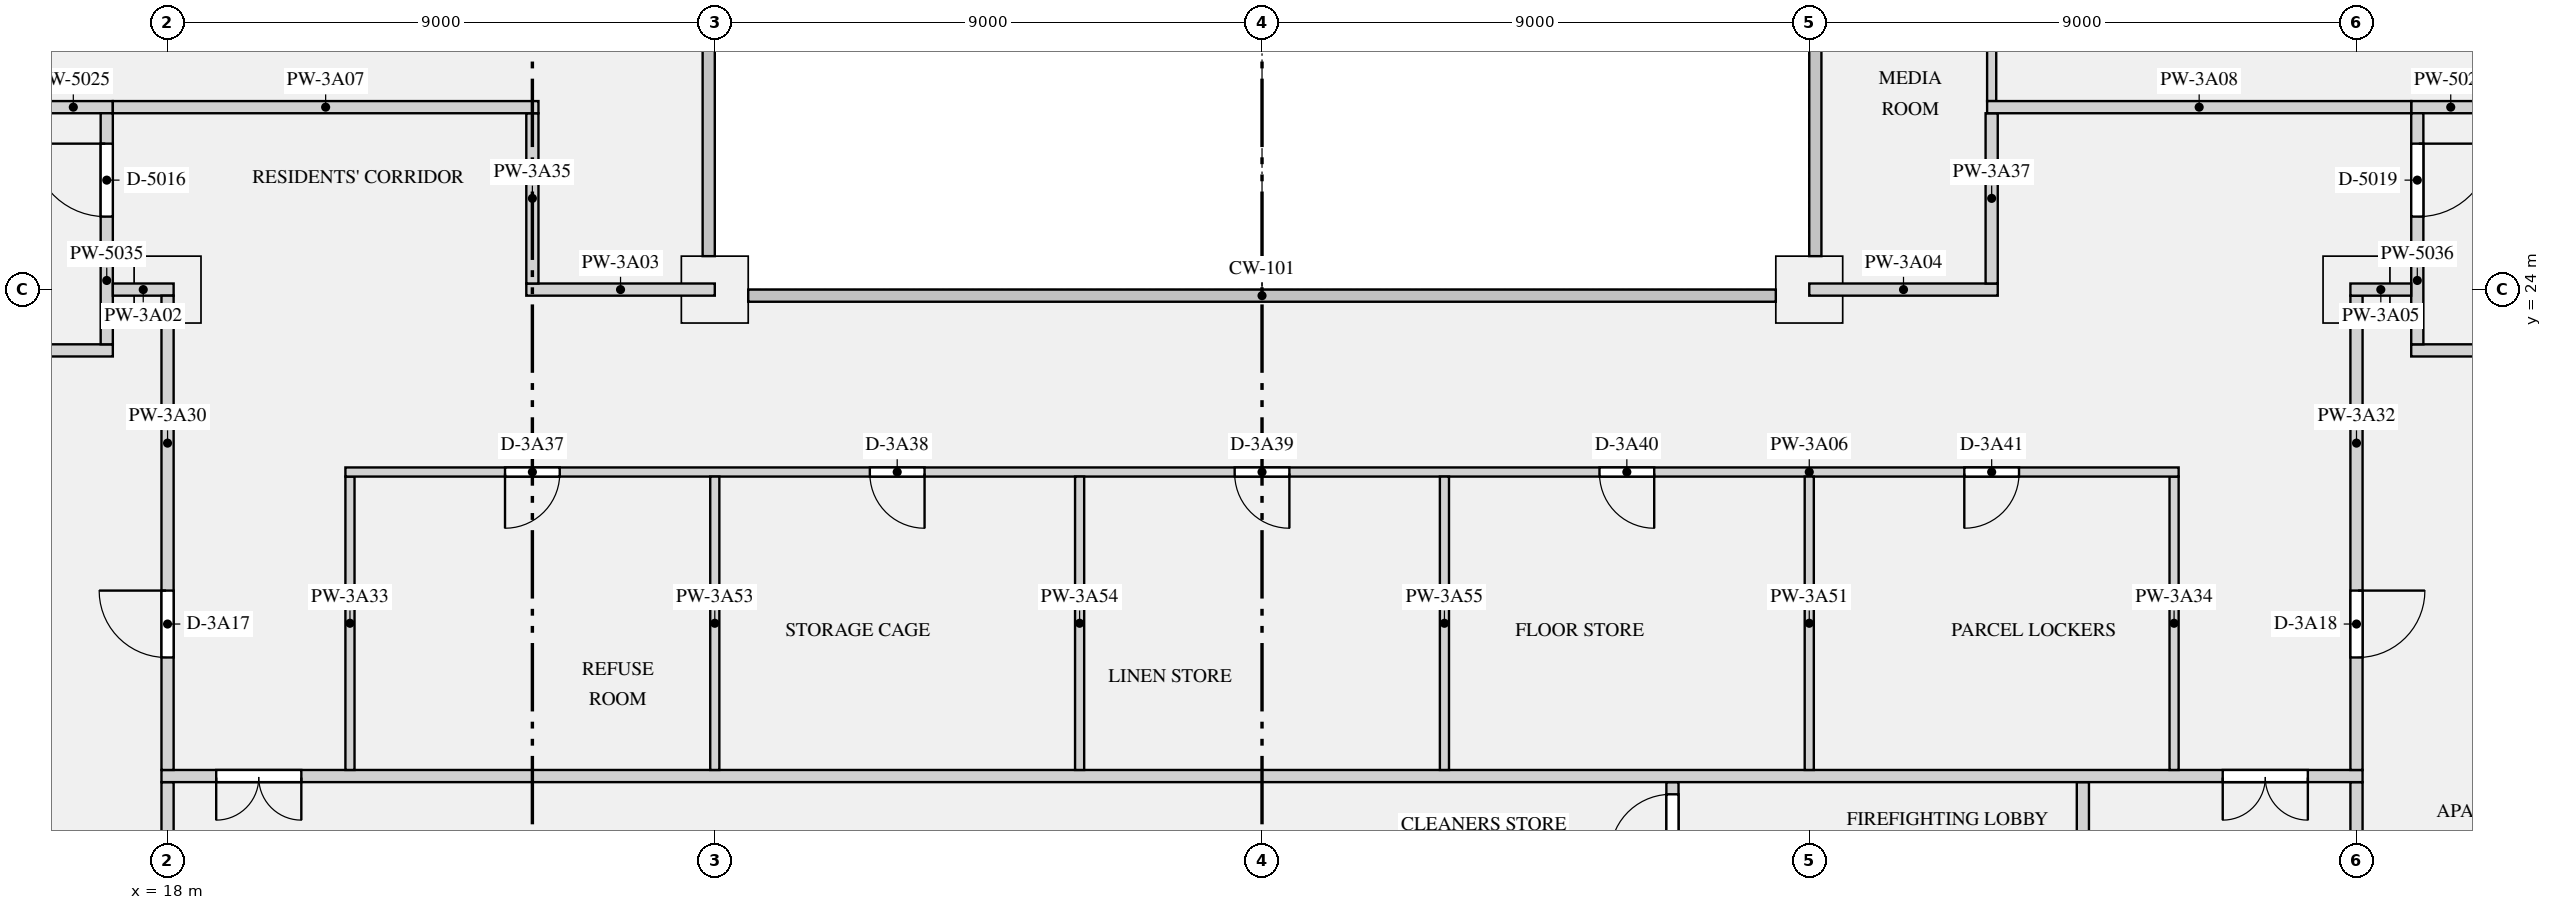
"""IFC4 building model, lengths in metres.
Left out: names, types, materials, properties, quantities, classifications, styles, units other than length and angle.
Written with IfcOpenShell. Run it as: python <this file> out.ifc"""

import sys

from ifc_helpers import new_model, si_unit, direction, frame, frame_2d, origin, origin_2d, place, context, subcontext, project, spatial, rectangle, extrude, element, fill, save


model = new_model("IFC4")
c1 = context("Model", 3, precision=1e-05, world=origin(), true_north=direction((0.0, 1.0)))
c2 = subcontext(c1, "Body", "Model", "MODEL_VIEW")
j1 = project(units=[si_unit("LENGTHUNIT", "METRE"), si_unit("PLANEANGLEUNIT", "RADIAN")], contexts=[c1])
p1 = place(None, origin())
s1 = spatial("IfcSite", under=j1, at=p1, CompositionType="ELEMENT")
p2 = place(p1, origin())
s2 = spatial("IfcBuilding", under=s1, at=p2, CompositionType="ELEMENT")
p3 = place(p2, frame((0.0, 0.0, 141.3)))
s3 = spatial("IfcBuildingStorey", under=s2, at=p3, CompositionType="ELEMENT", Elevation=141.3)
for number, where, z_axis, x_axis in (
    (1, (18.0, 24.0, 0.0), (0.0, 0.0, 1.0), (1.0, 0.0, 0.0)),
    (2, (27.0, 24.0, 0.0), (0.0, 0.0, 1.0), (1.0, 0.0, 0.0)),
    (3, (45.0, 24.0, 0.0), (0.0, 0.0, 1.0), (1.0, 0.0, 0.0)),
    (4, (54.0, 24.0, 0.0), (0.0, 0.0, 1.0), (1.0, 0.0, 0.0)),
):
    element("IfcColumn", number, at=place(p3, frame(where, z_axis=z_axis, x_axis=x_axis)), inside=s3, PredefinedType="COLUMN", context=c2, shape_type="SweptSolid", body=[
        extrude(rectangle(XDim=1.1, YDim=1.1, at=origin_2d()), origin(), (0.0, 0.0, 1.0), 3.15),
    ])
for number, where, z_axis, x_axis in (
    (5, (12.1, 23.0, 0.0), (0.0, 0.0, 1.0), (1.0, 0.0, 0.0)),
    (6, (54.9, 23.0, 0.0), (0.0, 0.0, 1.0), (1.0, 0.0, 0.0)),
):
    element("IfcWall", number, at=place(p3, frame(where, z_axis=z_axis, x_axis=x_axis)), inside=s3, PredefinedType="PARTITIONING", context=c2, shape_type="SweptSolid", body=[
        extrude(rectangle(XDim=5.0, YDim=0.2, at=frame_2d((2.5, 0.0))), origin(), (0.0, 0.0, 1.0), 2.83),
    ])
for number, where, z_axis, x_axis in (
    (7, (15.8, 27.0, 0.0), (0.0, 0.0, 1.0), (1.0, 0.0, 0.0)),
    (8, (54.9, 27.0, 0.0), (0.0, 0.0, 1.0), (1.0, 0.0, 0.0)),
):
    element("IfcWall", number, at=place(p3, frame(where, z_axis=z_axis, x_axis=x_axis)), inside=s3, PredefinedType="PARTITIONING", context=c2, shape_type="SweptSolid", body=[
        extrude(rectangle(XDim=1.3, YDim=0.2, at=frame_2d((0.65, 0.0))), origin(), (0.0, 0.0, 1.0), 2.83),
    ])
p4 = place(p3, frame((18.0, 12.5, 0.0), z_axis=(0.0, 0.0, 1.0), x_axis=(0.0, 1.0, 0.0)))
e9 = element("IfcWall", 9, at=p4, inside=s3, PredefinedType="PARTITIONING", context=c2, shape_type="SweptSolid", body=[
    extrude(rectangle(XDim=3.4, YDim=0.2, at=frame_2d((1.7, 0.0))), origin(), (0.0, 0.0, 1.0), 2.83),
])
p5 = place(p3, frame((49.5, 12.5, 0.0), z_axis=(0.0, 0.0, 1.0), x_axis=(0.0, 1.0, 0.0)))
e10 = element("IfcWall", 10, at=p5, inside=s3, PredefinedType="PARTITIONING", context=c2, shape_type="SweptSolid", body=[
    extrude(rectangle(XDim=3.4, YDim=0.2, at=frame_2d((1.7, 0.0))), origin(), (0.0, 0.0, 1.0), 2.83),
])
p6 = place(p5, frame((1.15, 0.0, 0.0)))
e11 = element("IfcOpeningElement", 11, at=p6, cuts=e10, PredefinedType="OPENING", context=c2, shape_type="SweptSolid", body=[
    extrude(rectangle(XDim=1.1, YDim=2.1, at=frame_2d((0.55, 1.05))), frame((0.0, 0.11, 0.0), z_axis=(0.0, -1.0, 0.0), x_axis=(1.0, 0.0, 0.0)), (0.0, 0.0, 1.0), 0.22),
])
p7 = place(p3, frame((54.0, 12.5, 0.0), z_axis=(0.0, 0.0, 1.0), x_axis=(0.0, 1.0, 0.0)))
e12 = element("IfcWall", 12, at=p7, inside=s3, PredefinedType="PARTITIONING", context=c2, shape_type="SweptSolid", body=[
    extrude(rectangle(XDim=3.4, YDim=0.2, at=frame_2d((1.7, 0.0))), origin(), (0.0, 0.0, 1.0), 2.83),
])
p8 = place(p3, frame((42.75, 14.575, 0.0), z_axis=(0.0, 0.0, 1.0), x_axis=(0.0, 1.0, 0.0)))
e13 = element("IfcWall", 13, at=p8, inside=s3, PredefinedType="PARTITIONING", context=c2, shape_type="SweptSolid", body=[
    extrude(rectangle(XDim=1.325, YDim=0.2, at=frame_2d((0.663, 0.0))), origin(), (0.0, 0.0, 1.0), 2.83),
])
p9 = place(p8, frame((0.125, 0.0, 0.0)))
e14 = element("IfcOpeningElement", 14, at=p9, cuts=e13, PredefinedType="OPENING", context=c2, shape_type="SweptSolid", body=[
    extrude(rectangle(XDim=1.0, YDim=2.1, at=frame_2d((0.5, 1.05))), frame((0.0, 0.11, 0.0), z_axis=(0.0, -1.0, 0.0), x_axis=(1.0, 0.0, 0.0)), (0.0, 0.0, 1.0), 0.22),
])
p10 = place(p3, frame((17.0, 23.1, 0.0), z_axis=(0.0, 0.0, 1.0), x_axis=(0.0, 1.0, 0.0)))
e15 = element("IfcWall", 15, at=p10, inside=s3, PredefinedType="PARTITIONING", context=c2, shape_type="SweptSolid", body=[
    extrude(rectangle(XDim=3.8, YDim=0.2, at=frame_2d((1.9, 0.0))), origin(), (0.0, 0.0, 1.0), 2.83),
])
p11 = place(p10, frame((2.1, 0.0, 0.0)))
e16 = element("IfcOpeningElement", 16, at=p11, cuts=e15, PredefinedType="OPENING", context=c2, shape_type="SweptSolid", body=[
    extrude(rectangle(XDim=1.2, YDim=2.1, at=frame_2d((0.6, 1.05))), frame((0.0, 0.11, 0.0), z_axis=(0.0, -1.0, 0.0), x_axis=(1.0, 0.0, 0.0)), (0.0, 0.0, 1.0), 0.22),
])
p12 = place(p3, frame((55.0, 23.1, 0.0), z_axis=(0.0, 0.0, 1.0), x_axis=(0.0, 1.0, 0.0)))
e17 = element("IfcWall", 17, at=p12, inside=s3, PredefinedType="PARTITIONING", context=c2, shape_type="SweptSolid", body=[
    extrude(rectangle(XDim=3.8, YDim=0.2, at=frame_2d((1.9, 0.0))), origin(), (0.0, 0.0, 1.0), 2.83),
])
p13 = place(p12, frame((2.1, 0.0, 0.0)))
e18 = element("IfcOpeningElement", 18, at=p13, cuts=e17, PredefinedType="OPENING", context=c2, shape_type="SweptSolid", body=[
    extrude(rectangle(XDim=1.2, YDim=2.1, at=frame_2d((0.6, 1.05))), frame((0.0, 0.11, 0.0), z_axis=(0.0, -1.0, 0.0), x_axis=(1.0, 0.0, 0.0)), (0.0, 0.0, 1.0), 0.22),
])
p14 = place(p3, frame((17.1, 24.0, 0.0), z_axis=(0.0, 0.0, 1.0), x_axis=(1.0, 0.0, 0.0)))
e19 = element("IfcWall", 19, at=p14, inside=s3, PredefinedType="PARTITIONING", context=c2, shape_type="SweptSolid", body=[
    extrude(rectangle(XDim=1.0, YDim=0.2, at=frame_2d((0.5, 0.0))), origin(), (0.0, 0.0, 1.0), 2.83),
])
for number, where, z_axis, x_axis in (
    (20, (23.9, 24.0, 0.0), (0.0, 0.0, 1.0), (1.0, 0.0, 0.0)),
    (21, (45.0, 24.0, 0.0), (0.0, 0.0, 1.0), (1.0, 0.0, 0.0)),
):
    element("IfcWall", number, at=place(p3, frame(where, z_axis=z_axis, x_axis=x_axis)), inside=s3, PredefinedType="PARTITIONING", context=c2, shape_type="SweptSolid", body=[
        extrude(rectangle(XDim=3.1, YDim=0.2, at=frame_2d((1.55, 0.0))), origin(), (0.0, 0.0, 1.0), 2.83),
    ])
p15 = place(p3, frame((53.9, 24.0, 0.0), z_axis=(0.0, 0.0, 1.0), x_axis=(1.0, 0.0, 0.0)))
e22 = element("IfcWall", 22, at=p15, inside=s3, PredefinedType="PARTITIONING", context=c2, shape_type="SweptSolid", body=[
    extrude(rectangle(XDim=1.0, YDim=0.2, at=frame_2d((0.5, 0.0))), origin(), (0.0, 0.0, 1.0), 2.83),
])
p16 = place(p3, frame((20.925, 21.0, 0.0), z_axis=(0.0, 0.0, 1.0), x_axis=(1.0, 0.0, 0.0)))
e23 = element("IfcWall", 23, at=p16, inside=s3, PredefinedType="PARTITIONING", context=c2, shape_type="SweptSolid", body=[
    extrude(rectangle(XDim=30.15, YDim=0.15, at=frame_2d((15.075, 0.0))), origin(), (0.0, 0.0, 1.0), 2.83),
])
p17 = place(p16, frame((2.625, 0.0, 0.0)))
e24 = element("IfcOpeningElement", 24, at=p17, cuts=e23, PredefinedType="OPENING", context=c2, shape_type="SweptSolid", body=[
    extrude(rectangle(XDim=0.9, YDim=2.1, at=frame_2d((0.45, 1.05))), frame((0.0, 0.085, 0.0), z_axis=(0.0, -1.0, 0.0), x_axis=(1.0, 0.0, 0.0)), (0.0, 0.0, 1.0), 0.17),
])
p18 = place(p16, frame((8.625, 0.0, 0.0)))
e25 = element("IfcOpeningElement", 25, at=p18, cuts=e23, PredefinedType="OPENING", context=c2, shape_type="SweptSolid", body=[
    extrude(rectangle(XDim=0.9, YDim=2.1, at=frame_2d((0.45, 1.05))), frame((0.0, 0.085, 0.0), z_axis=(0.0, -1.0, 0.0), x_axis=(1.0, 0.0, 0.0)), (0.0, 0.0, 1.0), 0.17),
])
p19 = place(p16, frame((14.625, 0.0, 0.0)))
e26 = element("IfcOpeningElement", 26, at=p19, cuts=e23, PredefinedType="OPENING", context=c2, shape_type="SweptSolid", body=[
    extrude(rectangle(XDim=0.9, YDim=2.1, at=frame_2d((0.45, 1.05))), frame((0.0, 0.085, 0.0), z_axis=(0.0, -1.0, 0.0), x_axis=(1.0, 0.0, 0.0)), (0.0, 0.0, 1.0), 0.17),
])
p20 = place(p16, frame((20.625, 0.0, 0.0)))
e27 = element("IfcOpeningElement", 27, at=p20, cuts=e23, PredefinedType="OPENING", context=c2, shape_type="SweptSolid", body=[
    extrude(rectangle(XDim=0.9, YDim=2.1, at=frame_2d((0.45, 1.05))), frame((0.0, 0.085, 0.0), z_axis=(0.0, -1.0, 0.0), x_axis=(1.0, 0.0, 0.0)), (0.0, 0.0, 1.0), 0.17),
])
p21 = place(p16, frame((26.625, 0.0, 0.0)))
e28 = element("IfcOpeningElement", 28, at=p21, cuts=e23, PredefinedType="OPENING", context=c2, shape_type="SweptSolid", body=[
    extrude(rectangle(XDim=0.9, YDim=2.1, at=frame_2d((0.45, 1.05))), frame((0.0, 0.085, 0.0), z_axis=(0.0, -1.0, 0.0), x_axis=(1.0, 0.0, 0.0)), (0.0, 0.0, 1.0), 0.17),
])
p22 = place(p3, frame((17.1, 27.0, 0.0), z_axis=(0.0, 0.0, 1.0), x_axis=(1.0, 0.0, 0.0)))
e29 = element("IfcWall", 29, at=p22, inside=s3, PredefinedType="PARTITIONING", context=c2, shape_type="SweptSolid", body=[
    extrude(rectangle(XDim=7.0, YDim=0.2, at=frame_2d((3.5, 0.0))), origin(), (0.0, 0.0, 1.0), 2.83),
])
p23 = place(p3, frame((47.925, 27.0, 0.0), z_axis=(0.0, 0.0, 1.0), x_axis=(1.0, 0.0, 0.0)))
e30 = element("IfcWall", 30, at=p23, inside=s3, PredefinedType="PARTITIONING", context=c2, shape_type="SweptSolid", body=[
    extrude(rectangle(XDim=6.975, YDim=0.2, at=frame_2d((3.487, 0.0))), origin(), (0.0, 0.0, 1.0), 2.83),
])
p24 = place(p3, frame((17.9, 16.0, 0.0), z_axis=(0.0, 0.0, 1.0), x_axis=(1.0, 0.0, 0.0)))
e31 = element("IfcWall", 31, at=p24, inside=s3, PredefinedType="PARTITIONING", context=c2, shape_type="SweptSolid", body=[
    extrude(rectangle(XDim=36.2, YDim=0.2, at=frame_2d((18.1, 0.0))), origin(), (0.0, 0.0, 1.0), 2.83),
])
p25 = place(p24, frame((0.9, 0.0, 0.0)))
e32 = element("IfcOpeningElement", 32, at=p25, cuts=e31, PredefinedType="OPENING", context=c2, shape_type="SweptSolid", body=[
    extrude(rectangle(XDim=1.4, YDim=2.1, at=frame_2d((0.7, 1.05))), frame((0.0, 0.11, 0.0), z_axis=(0.0, -1.0, 0.0), x_axis=(1.0, 0.0, 0.0)), (0.0, 0.0, 1.0), 0.22),
])
p26 = place(p24, frame((33.9, 0.0, 0.0)))
e33 = element("IfcOpeningElement", 33, at=p26, cuts=e31, PredefinedType="OPENING", context=c2, shape_type="SweptSolid", body=[
    extrude(rectangle(XDim=1.4, YDim=2.1, at=frame_2d((0.7, 1.05))), frame((0.0, 0.11, 0.0), z_axis=(0.0, -1.0, 0.0), x_axis=(1.0, 0.0, 0.0)), (0.0, 0.0, 1.0), 0.22),
])
p27 = place(p3, frame((18.0, 16.1, 0.0), z_axis=(0.0, 0.0, 1.0), x_axis=(0.0, 1.0, 0.0)))
e34 = element("IfcWall", 34, at=p27, inside=s3, PredefinedType="PARTITIONING", context=c2, shape_type="SweptSolid", body=[
    extrude(rectangle(XDim=7.8, YDim=0.2, at=frame_2d((3.9, 0.0))), origin(), (0.0, 0.0, 1.0), 2.83),
])
p28 = place(p27, frame((1.85, 0.0, 0.0)))
e35 = element("IfcOpeningElement", 35, at=p28, cuts=e34, PredefinedType="OPENING", context=c2, shape_type="SweptSolid", body=[
    extrude(rectangle(XDim=1.1, YDim=2.1, at=frame_2d((0.55, 1.05))), frame((0.0, 0.11, 0.0), z_axis=(0.0, -1.0, 0.0), x_axis=(1.0, 0.0, 0.0)), (0.0, 0.0, 1.0), 0.22),
])
p29 = place(p3, frame((54.0, 16.1, 0.0), z_axis=(0.0, 0.0, 1.0), x_axis=(0.0, 1.0, 0.0)))
e36 = element("IfcWall", 36, at=p29, inside=s3, PredefinedType="PARTITIONING", context=c2, shape_type="SweptSolid", body=[
    extrude(rectangle(XDim=7.8, YDim=0.2, at=frame_2d((3.9, 0.0))), origin(), (0.0, 0.0, 1.0), 2.83),
])
p30 = place(p29, frame((1.85, 0.0, 0.0)))
e37 = element("IfcOpeningElement", 37, at=p30, cuts=e36, PredefinedType="OPENING", context=c2, shape_type="SweptSolid", body=[
    extrude(rectangle(XDim=1.1, YDim=2.1, at=frame_2d((0.55, 1.05))), frame((0.0, 0.11, 0.0), z_axis=(0.0, -1.0, 0.0), x_axis=(1.0, 0.0, 0.0)), (0.0, 0.0, 1.0), 0.22),
])
for number, where, z_axis, x_axis in (
    (38, (21.0, 16.1, 0.0), (0.0, 0.0, 1.0), (0.0, 1.0, 0.0)),
    (39, (51.0, 16.1, 0.0), (0.0, 0.0, 1.0), (0.0, 1.0, 0.0)),
):
    element("IfcWall", number, at=place(p3, frame(where, z_axis=z_axis, x_axis=x_axis)), inside=s3, PredefinedType="PARTITIONING", context=c2, shape_type="SweptSolid", body=[
        extrude(rectangle(XDim=4.825, YDim=0.15, at=frame_2d((2.413, 0.0))), origin(), (0.0, 0.0, 1.0), 2.83),
    ])
p31 = place(p3, frame((24.0, 24.1, 0.0), z_axis=(0.0, 0.0, 1.0), x_axis=(0.0, 1.0, 0.0)))
e40 = element("IfcWall", 40, at=p31, inside=s3, PredefinedType="PARTITIONING", context=c2, shape_type="SweptSolid", body=[
    extrude(rectangle(XDim=2.8, YDim=0.2, at=frame_2d((1.4, 0.0))), origin(), (0.0, 0.0, 1.0), 2.83),
])
p32 = place(p3, frame((48.0, 27.1, 0.0), z_axis=(0.0, 0.0, 1.0), x_axis=(0.0, 1.0, 0.0)))
e41 = element("IfcWall", 41, at=p32, inside=s3, PredefinedType="PARTITIONING", context=c2, shape_type="SweptSolid", body=[
    extrude(rectangle(XDim=8.325, YDim=0.15, at=frame_2d((4.163, 0.0))), origin(), (0.0, 0.0, 1.0), 2.83),
])
p33 = place(p3, frame((48.0, 24.1, 0.0), z_axis=(0.0, 0.0, 1.0), x_axis=(0.0, 1.0, 0.0)))
e42 = element("IfcWall", 42, at=p33, inside=s3, PredefinedType="PARTITIONING", context=c2, shape_type="SweptSolid", body=[
    extrude(rectangle(XDim=2.8, YDim=0.2, at=frame_2d((1.4, 0.0))), origin(), (0.0, 0.0, 1.0), 2.83),
])
for number, where, z_axis, x_axis in (
    (43, (45.0, 16.1, 0.0), (0.0, 0.0, 1.0), (0.0, 1.0, 0.0)),
    (44, (27.0, 16.1, 0.0), (0.0, 0.0, 1.0), (0.0, 1.0, 0.0)),
    (45, (33.0, 16.1, 0.0), (0.0, 0.0, 1.0), (0.0, 1.0, 0.0)),
    (46, (39.0, 16.1, 0.0), (0.0, 0.0, 1.0), (0.0, 1.0, 0.0)),
):
    element("IfcWall", number, at=place(p3, frame(where, z_axis=z_axis, x_axis=x_axis)), inside=s3, PredefinedType="PARTITIONING", context=c2, shape_type="SweptSolid", body=[
        extrude(rectangle(XDim=4.825, YDim=0.15, at=frame_2d((2.413, 0.0))), origin(), (0.0, 0.0, 1.0), 2.83),
    ])
p34 = place(p11, origin())
e47 = element("IfcDoor", 47, at=p34, inside=s3, OperationType="SINGLE_SWING_RIGHT", PredefinedType="DOOR", context=c2, shape_type="SweptSolid", body=[
    extrude(rectangle(XDim=1.2, YDim=2.1, at=frame_2d((0.6, 1.05))), frame((0.0, 0.025, 0.0), z_axis=(0.0, -1.0, 0.0), x_axis=(1.0, 0.0, 0.0)), (0.0, 0.0, 1.0), 0.05),
])
fill(e16, e47)
p35 = place(p13, frame((1.2, 0.0, 0.0), z_axis=(0.0, 0.0, 1.0), x_axis=(-1.0, 0.0, 0.0)))
e48 = element("IfcDoor", 48, at=p35, inside=s3, OperationType="SINGLE_SWING_LEFT", PredefinedType="DOOR", context=c2, shape_type="SweptSolid", body=[
    extrude(rectangle(XDim=1.2, YDim=2.1, at=frame_2d((0.6, 1.05))), frame((0.0, 0.025, 0.0), z_axis=(0.0, -1.0, 0.0), x_axis=(1.0, 0.0, 0.0)), (0.0, 0.0, 1.0), 0.05),
])
fill(e18, e48)
p36 = place(p9, origin())
e49 = element("IfcDoor", 49, at=p36, inside=s3, OperationType="SINGLE_SWING_LEFT", PredefinedType="DOOR", context=c2, shape_type="SweptSolid", body=[
    extrude(rectangle(XDim=1.0, YDim=2.1, at=frame_2d((0.5, 1.05))), frame((0.0, 0.025, 0.0), z_axis=(0.0, -1.0, 0.0), x_axis=(1.0, 0.0, 0.0)), (0.0, 0.0, 1.0), 0.05),
])
fill(e14, e49)
p37 = place(p25, frame((1.4, 0.0, 0.0), z_axis=(0.0, 0.0, 1.0), x_axis=(-1.0, 0.0, 0.0)))
e50 = element("IfcDoor", 50, at=p37, inside=s3, OperationType="DOUBLE_DOOR_SINGLE_SWING", PredefinedType="DOOR", context=c2, shape_type="SweptSolid", body=[
    extrude(rectangle(XDim=1.4, YDim=2.1, at=frame_2d((0.7, 1.05))), frame((0.0, 0.025, 0.0), z_axis=(0.0, -1.0, 0.0), x_axis=(1.0, 0.0, 0.0)), (0.0, 0.0, 1.0), 0.05),
])
fill(e32, e50)
p38 = place(p26, frame((1.4, 0.0, 0.0), z_axis=(0.0, 0.0, 1.0), x_axis=(-1.0, 0.0, 0.0)))
e51 = element("IfcDoor", 51, at=p38, inside=s3, OperationType="DOUBLE_DOOR_SINGLE_SWING", PredefinedType="DOOR", context=c2, shape_type="SweptSolid", body=[
    extrude(rectangle(XDim=1.4, YDim=2.1, at=frame_2d((0.7, 1.05))), frame((0.0, 0.025, 0.0), z_axis=(0.0, -1.0, 0.0), x_axis=(1.0, 0.0, 0.0)), (0.0, 0.0, 1.0), 0.05),
])
fill(e33, e51)
p39 = place(p28, origin())
e52 = element("IfcDoor", 52, at=p39, inside=s3, OperationType="SINGLE_SWING_RIGHT", PredefinedType="DOOR", context=c2, shape_type="SweptSolid", body=[
    extrude(rectangle(XDim=1.1, YDim=2.1, at=frame_2d((0.55, 1.05))), frame((0.0, 0.025, 0.0), z_axis=(0.0, -1.0, 0.0), x_axis=(1.0, 0.0, 0.0)), (0.0, 0.0, 1.0), 0.05),
])
fill(e35, e52)
p40 = place(p30, frame((1.1, 0.0, 0.0), z_axis=(0.0, 0.0, 1.0), x_axis=(-1.0, 0.0, 0.0)))
e53 = element("IfcDoor", 53, at=p40, inside=s3, OperationType="SINGLE_SWING_LEFT", PredefinedType="DOOR", context=c2, shape_type="SweptSolid", body=[
    extrude(rectangle(XDim=1.1, YDim=2.1, at=frame_2d((0.55, 1.05))), frame((0.0, 0.025, 0.0), z_axis=(0.0, -1.0, 0.0), x_axis=(1.0, 0.0, 0.0)), (0.0, 0.0, 1.0), 0.05),
])
fill(e37, e53)
p41 = place(p17, frame((0.9, 0.0, 0.0), z_axis=(0.0, 0.0, 1.0), x_axis=(-1.0, 0.0, 0.0)))
e54 = element("IfcDoor", 54, at=p41, inside=s3, OperationType="SINGLE_SWING_RIGHT", PredefinedType="DOOR", context=c2, shape_type="SweptSolid", body=[
    extrude(rectangle(XDim=0.9, YDim=2.1, at=frame_2d((0.45, 1.05))), frame((0.0, 0.025, 0.0), z_axis=(0.0, -1.0, 0.0), x_axis=(1.0, 0.0, 0.0)), (0.0, 0.0, 1.0), 0.05),
])
fill(e24, e54)
p42 = place(p18, frame((0.9, 0.0, 0.0), z_axis=(0.0, 0.0, 1.0), x_axis=(-1.0, 0.0, 0.0)))
e55 = element("IfcDoor", 55, at=p42, inside=s3, OperationType="SINGLE_SWING_LEFT", PredefinedType="DOOR", context=c2, shape_type="SweptSolid", body=[
    extrude(rectangle(XDim=0.9, YDim=2.1, at=frame_2d((0.45, 1.05))), frame((0.0, 0.025, 0.0), z_axis=(0.0, -1.0, 0.0), x_axis=(1.0, 0.0, 0.0)), (0.0, 0.0, 1.0), 0.05),
])
fill(e25, e55)
p43 = place(p19, frame((0.9, 0.0, 0.0), z_axis=(0.0, 0.0, 1.0), x_axis=(-1.0, 0.0, 0.0)))
e56 = element("IfcDoor", 56, at=p43, inside=s3, OperationType="SINGLE_SWING_LEFT", PredefinedType="DOOR", context=c2, shape_type="SweptSolid", body=[
    extrude(rectangle(XDim=0.9, YDim=2.1, at=frame_2d((0.45, 1.05))), frame((0.0, 0.025, 0.0), z_axis=(0.0, -1.0, 0.0), x_axis=(1.0, 0.0, 0.0)), (0.0, 0.0, 1.0), 0.05),
])
fill(e26, e56)
p44 = place(p20, frame((0.9, 0.0, 0.0), z_axis=(0.0, 0.0, 1.0), x_axis=(-1.0, 0.0, 0.0)))
e57 = element("IfcDoor", 57, at=p44, inside=s3, OperationType="SINGLE_SWING_LEFT", PredefinedType="DOOR", context=c2, shape_type="SweptSolid", body=[
    extrude(rectangle(XDim=0.9, YDim=2.1, at=frame_2d((0.45, 1.05))), frame((0.0, 0.025, 0.0), z_axis=(0.0, -1.0, 0.0), x_axis=(1.0, 0.0, 0.0)), (0.0, 0.0, 1.0), 0.05),
])
fill(e27, e57)
p45 = place(p21, frame((0.9, 0.0, 0.0), z_axis=(0.0, 0.0, 1.0), x_axis=(-1.0, 0.0, 0.0)))
e58 = element("IfcDoor", 58, at=p45, inside=s3, OperationType="SINGLE_SWING_RIGHT", PredefinedType="DOOR", context=c2, shape_type="SweptSolid", body=[
    extrude(rectangle(XDim=0.9, YDim=2.1, at=frame_2d((0.45, 1.05))), frame((0.0, 0.025, 0.0), z_axis=(0.0, -1.0, 0.0), x_axis=(1.0, 0.0, 0.0)), (0.0, 0.0, 1.0), 0.05),
])
fill(e28, e58)
save(model, sys.argv[1])
